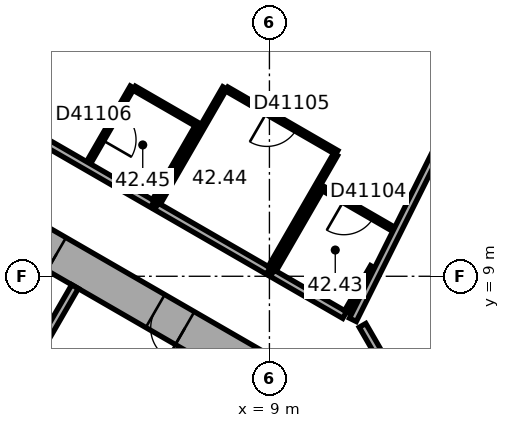
"""IFC4 building model, lengths in metres.
Left out: names, types, materials, properties, quantities, classifications, styles, units other than length and angle.
Written with IfcOpenShell. Run it as: python <this file> out.ifc"""

import sys

from ifc_helpers import new_model, si_unit, direction, frame, frame_2d, origin, place, context, subcontext, project, spatial, rectangle, extrude, element, fill, save


model = new_model("IFC4")
c1 = context("Model", 3, precision=1e-05, world=origin(), true_north=direction((0.0, 1.0)))
c2 = subcontext(c1, "Body", "Model", "MODEL_VIEW")
j1 = project(units=[si_unit("LENGTHUNIT", "METRE"), si_unit("PLANEANGLEUNIT", "RADIAN")], contexts=[c1])
p1 = place(None, origin())
s1 = spatial("IfcSite", under=j1, at=p1, CompositionType="ELEMENT")
p2 = place(p1, origin())
s2 = spatial("IfcBuilding", under=s1, at=p2, CompositionType="ELEMENT")
p3 = place(p2, frame((0.0, 0.0, 172.5)))
s3 = spatial("IfcBuildingStorey", under=s2, at=p3, CompositionType="ELEMENT", Elevation=172.5)
p4 = place(p3, frame((10.25, 5.629, 0.0), z_axis=(0.0, 0.0, 1.0), x_axis=(-0.866022616891, 0.50000482701, 0.0)))
e1 = element("IfcWall", 1, at=p4, inside=s3, PredefinedType="SHEAR", context=c2, shape_type="SweptSolid", body=[
    extrude(rectangle(XDim=12.125, YDim=1.0, at=frame_2d((6.062, 0.0))), origin(), (0.0, 0.0, 1.0), 3.7),
])
p5 = place(p4, frame((4.012, 0.0, 0.0)))
e2 = element("IfcOpeningElement", 2, at=p5, cuts=e1, PredefinedType="OPENING", context=c2, shape_type="SweptSolid", body=[
    extrude(rectangle(XDim=0.9, YDim=2.1, at=frame_2d((0.45, 1.05))), frame((0.0, 0.51, 0.0), z_axis=(0.0, -1.0, 0.0), x_axis=(1.0, 0.0, 0.0)), (0.0, 0.0, 1.0), 1.02),
])
p6 = place(p4, frame((7.912, 0.0, 0.0)))
e3 = element("IfcOpeningElement", 3, at=p6, cuts=e1, PredefinedType="OPENING", context=c2, shape_type="SweptSolid", body=[
    extrude(rectangle(XDim=0.9, YDim=2.1, at=frame_2d((0.45, 1.05))), frame((0.0, 0.51, 0.0), z_axis=(0.0, -1.0, 0.0), x_axis=(1.0, 0.0, 0.0)), (0.0, 0.0, 1.0), 1.02),
])
p7 = place(p3, frame((19.464, 14.599, 0.0), z_axis=(0.0, 0.0, 1.0), x_axis=(-0.894935755043, 0.446195018289, 0.0)))
e4 = element("IfcWall", 4, at=p7, inside=s3, PredefinedType="STANDARD", context=c2, shape_type="SweptSolid", body=[
    extrude(rectangle(XDim=20.044, YDim=0.2, at=frame_2d((10.022, 0.0))), origin(), (0.0, 0.0, 1.0), 3.7),
])
p8 = place(p7, frame((1.313, 0.0, 0.9)))
e5 = element("IfcOpeningElement", 5, at=p8, cuts=e4, PredefinedType="OPENING", context=c2, shape_type="SweptSolid", body=[
    extrude(rectangle(XDim=2.4, YDim=2.0, at=frame_2d((1.2, 1.0))), frame((0.0, 0.11, 0.0), z_axis=(0.0, -1.0, 0.0), x_axis=(1.0, 0.0, 0.0)), (0.0, 0.0, 1.0), 0.22),
])
p9 = place(p7, frame((5.067, 0.0, 0.9)))
e6 = element("IfcOpeningElement", 6, at=p9, cuts=e4, PredefinedType="OPENING", context=c2, shape_type="SweptSolid", body=[
    extrude(rectangle(XDim=2.4, YDim=2.0, at=frame_2d((1.2, 1.0))), frame((0.0, 0.11, 0.0), z_axis=(0.0, -1.0, 0.0), x_axis=(1.0, 0.0, 0.0)), (0.0, 0.0, 1.0), 0.22),
])
p10 = place(p7, frame((8.821, 0.0, 0.9)))
e7 = element("IfcOpeningElement", 7, at=p10, cuts=e4, PredefinedType="OPENING", context=c2, shape_type="SweptSolid", body=[
    extrude(rectangle(XDim=2.4, YDim=2.0, at=frame_2d((1.2, 1.0))), frame((0.0, 0.11, 0.0), z_axis=(0.0, -1.0, 0.0), x_axis=(1.0, 0.0, 0.0)), (0.0, 0.0, 1.0), 0.22),
])
p11 = place(p7, frame((12.575, 0.0, 0.9)))
e8 = element("IfcOpeningElement", 8, at=p11, cuts=e4, PredefinedType="OPENING", context=c2, shape_type="SweptSolid", body=[
    extrude(rectangle(XDim=2.4, YDim=2.0, at=frame_2d((1.2, 1.0))), frame((0.0, 0.11, 0.0), z_axis=(0.0, -1.0, 0.0), x_axis=(1.0, 0.0, 0.0)), (0.0, 0.0, 1.0), 0.22),
])
p12 = place(p7, frame((16.329, 0.0, 0.9)))
e9 = element("IfcOpeningElement", 9, at=p12, cuts=e4, PredefinedType="OPENING", context=c2, shape_type="SweptSolid", body=[
    extrude(rectangle(XDim=2.4, YDim=2.0, at=frame_2d((1.2, 1.0))), frame((0.0, 0.11, 0.0), z_axis=(0.0, -1.0, 0.0), x_axis=(1.0, 0.0, 0.0)), (0.0, 0.0, 1.0), 0.22),
])
p13 = place(p3, frame((7.424, 4.259, 0.0), z_axis=(0.0, 0.0, 1.0), x_axis=(-0.866026010844, 0.49999894854, 0.0)))
e10 = element("IfcWall", 10, at=p13, inside=s3, PredefinedType="PARTITIONING", context=c2, shape_type="SweptSolid", body=[
    extrude(rectangle(XDim=8.0, YDim=0.2, at=frame_2d((4.0, 0.0))), origin(), (0.0, 0.0, 1.0), 3.42),
])
p14 = place(p3, frame((2.784, 6.822, 0.0), z_axis=(0.0, 0.0, 1.0), x_axis=(0.50002983664, 0.866008176907, 0.0)))
e11 = element("IfcWall", 11, at=p14, inside=s3, PredefinedType="PARTITIONING", context=c2, shape_type="SweptSolid", body=[
    extrude(rectangle(XDim=2.2, YDim=0.2, at=frame_2d((1.1, 0.0))), origin(), (0.0, 0.0, 1.0), 3.42),
])
p15 = place(p3, frame((6.303, 4.617, 0.0), z_axis=(0.0, 0.0, 1.0), x_axis=(-0.866027801685, 0.499995846692, 0.0)))
e12 = element("IfcWall", 12, at=p15, inside=s3, PredefinedType="SHEAR", context=c2, shape_type="SweptSolid", body=[
    extrude(rectangle(XDim=7.06, YDim=0.3, at=frame_2d((3.53, 0.0))), origin(), (0.0, 0.0, 1.0), 3.42),
])
p16 = place(p3, frame((4.24, 11.986, 0.0), z_axis=(0.0, 0.0, 1.0), x_axis=(0.499952165731, 0.866053019151, 0.0)))
e13 = element("IfcWall", 13, at=p16, inside=s3, PredefinedType="PARTITIONING", context=c2, shape_type="SweptSolid", body=[
    extrude(rectangle(XDim=2.3, YDim=0.12, at=frame_2d((1.15, 0.0))), origin(), (0.0, 0.0, 1.0), 3.42),
])
p17 = place(p16, frame((0.7, 0.0, 0.0)))
e14 = element("IfcOpeningElement", 14, at=p17, cuts=e13, PredefinedType="OPENING", context=c2, shape_type="SweptSolid", body=[
    extrude(rectangle(XDim=0.9, YDim=2.1, at=frame_2d((0.45, 1.05))), frame((0.0, 0.07, 0.0), z_axis=(0.0, -1.0, 0.0), x_axis=(1.0, 0.0, 0.0)), (0.0, 0.0, 1.0), 0.14),
])
p18 = place(p3, frame((5.442, 13.948, 0.0), z_axis=(0.0, 0.0, 1.0), x_axis=(0.866043088465, -0.499969367985, 0.0)))
e15 = element("IfcWall", 15, at=p18, inside=s3, PredefinedType="PARTITIONING", context=c2, shape_type="SweptSolid", body=[
    extrude(rectangle(XDim=1.94, YDim=0.12, at=frame_2d((0.97, 0.0))), origin(), (0.0, 0.0, 1.0), 3.42),
])
p19 = place(p3, frame((5.922, 10.899, 0.0), z_axis=(0.0, 0.0, 1.0), x_axis=(-0.866031556924, 0.499989342298, 0.0)))
e16 = element("IfcWall", 16, at=p19, inside=s3, PredefinedType="PARTITIONING", context=c2, shape_type="SweptSolid", body=[
    extrude(rectangle(XDim=5.701, YDim=0.2, at=frame_2d((2.851, 0.0))), origin(), (0.0, 0.0, 1.0), 3.42),
])
p20 = place(p3, frame((6.076, 10.926, 0.0), z_axis=(0.0, 0.0, 1.0), x_axis=(0.500010275428, 0.866019471182, 0.0)))
e17 = element("IfcWall", 17, at=p20, inside=s3, PredefinedType="PARTITIONING", context=c2, shape_type="SweptSolid", body=[
    extrude(rectangle(XDim=3.5, YDim=0.12, at=frame_2d((1.75, 0.0))), origin(), (0.0, 0.0, 1.0), 3.42),
])
p21 = place(p3, frame((7.092, 12.926, 0.0), z_axis=(0.0, 0.0, 1.0), x_axis=(-0.500030632641, -0.866007717299, 0.0)))
e18 = element("IfcWall", 18, at=p21, inside=s3, PredefinedType="PARTITIONING", context=c2, shape_type="SweptSolid", body=[
    extrude(rectangle(XDim=2.24, YDim=0.12, at=frame_2d((1.12, 0.0))), origin(), (0.0, 0.0, 1.0), 3.42),
])
p22 = place(p3, frame((7.878, 13.927, 0.0), z_axis=(0.0, 0.0, 1.0), x_axis=(0.866021245731, -0.500007201891, 0.0)))
e19 = element("IfcWall", 19, at=p22, inside=s3, PredefinedType="PARTITIONING", context=c2, shape_type="SweptSolid", body=[
    extrude(rectangle(XDim=3.34, YDim=0.12, at=frame_2d((1.67, 0.0))), origin(), (0.0, 0.0, 1.0), 3.42),
])
p23 = place(p22, frame((1.22, 0.0, 0.0)))
e20 = element("IfcOpeningElement", 20, at=p23, cuts=e19, PredefinedType="OPENING", context=c2, shape_type="SweptSolid", body=[
    extrude(rectangle(XDim=0.9, YDim=2.1, at=frame_2d((0.45, 1.05))), frame((0.0, 0.07, 0.0), z_axis=(0.0, -1.0, 0.0), x_axis=(1.0, 0.0, 0.0)), (0.0, 0.0, 1.0), 0.14),
])
p24 = place(p3, frame((8.971, 9.139, 0.0), z_axis=(0.0, 0.0, 1.0), x_axis=(-0.866038511948, 0.499977295307, 0.0)))
e21 = element("IfcWall", 21, at=p24, inside=s3, PredefinedType="PARTITIONING", context=c2, shape_type="SweptSolid", body=[
    extrude(rectangle(XDim=3.4, YDim=0.2, at=frame_2d((1.7, 0.0))), origin(), (0.0, 0.0, 1.0), 3.42),
])
p25 = place(p3, frame((9.125, 9.166, 0.0), z_axis=(0.0, 0.0, 1.0), x_axis=(0.500004234368, 0.866022959057, 0.0)))
e22 = element("IfcWall", 22, at=p25, inside=s3, PredefinedType="PARTITIONING", context=c2, shape_type="SweptSolid", body=[
    extrude(rectangle(XDim=2.5, YDim=0.12, at=frame_2d((1.25, 0.0))), origin(), (0.0, 0.0, 1.0), 3.42),
])
p26 = place(p3, frame((10.427, 11.301, 0.0), z_axis=(0.0, 0.0, 1.0), x_axis=(0.866019511163, -0.500010206181, 0.0)))
e23 = element("IfcWall", 23, at=p26, inside=s3, PredefinedType="PARTITIONING", context=c2, shape_type="SweptSolid", body=[
    extrude(rectangle(XDim=2.13, YDim=0.12, at=frame_2d((1.065, 0.0))), origin(), (0.0, 0.0, 1.0), 3.42),
])
p27 = place(p26, frame((0.615, 0.0, 0.0)))
e24 = element("IfcOpeningElement", 24, at=p27, cuts=e23, PredefinedType="OPENING", context=c2, shape_type="SweptSolid", body=[
    extrude(rectangle(XDim=0.9, YDim=2.1, at=frame_2d((0.45, 1.05))), frame((0.0, 0.07, 0.0), z_axis=(0.0, -1.0, 0.0), x_axis=(1.0, 0.0, 0.0)), (0.0, 0.0, 1.0), 0.14),
])
p28 = place(p3, frame((10.74, 12.205, 0.0), z_axis=(0.0, 0.0, 1.0), x_axis=(-0.499978425106, -0.866037859697, 0.0)))
e25 = element("IfcWall", 25, at=p28, inside=s3, PredefinedType="PARTITIONING", context=c2, shape_type="SweptSolid", body=[
    extrude(rectangle(XDim=3.44, YDim=0.12, at=frame_2d((1.72, 0.0))), origin(), (0.0, 0.0, 1.0), 3.42),
])
p29 = place(p3, frame((10.98, 7.979, 0.0), z_axis=(0.0, 0.0, 1.0), x_axis=(-0.866008176907, 0.50002983664, 0.0)))
e26 = element("IfcWall", 26, at=p29, inside=s3, PredefinedType="PARTITIONING", context=c2, shape_type="SweptSolid", body=[
    extrude(rectangle(XDim=2.2, YDim=0.2, at=frame_2d((1.1, 0.0))), origin(), (0.0, 0.0, 1.0), 3.42),
])
p30 = place(p3, frame((11.714, 9.25, 0.0), z_axis=(0.0, 0.0, 1.0), x_axis=(-0.500015945769, -0.866016197294, 0.0)))
e27 = element("IfcWall", 27, at=p30, inside=s3, PredefinedType="PARTITIONING", context=c2, shape_type="SweptSolid", body=[
    extrude(rectangle(XDim=1.368, YDim=0.12, at=frame_2d((0.684, 0.0))), origin(), (0.0, 0.0, 1.0), 3.42),
])
p31 = place(p3, frame((12.38, 6.097, 0.0), z_axis=(0.0, 0.0, 1.0), x_axis=(-0.499964847546, 0.866045698112, 0.0)))
e28 = element("IfcWall", 28, at=p31, inside=s3, PredefinedType="PARTITIONING", context=c2, shape_type="SweptSolid", body=[
    extrude(rectangle(XDim=1.86, YDim=0.2, at=frame_2d((0.93, 0.0))), origin(), (0.0, 0.0, 1.0), 3.42),
])
p32 = place(p3, frame((15.09, 15.663, 0.0), z_axis=(0.0, 0.0, 1.0), x_axis=(-0.446206011687, -0.894930273895, 0.0)))
e29 = element("IfcWall", 29, at=p32, inside=s3, PredefinedType="PARTITIONING", context=c2, shape_type="SweptSolid", body=[
    extrude(rectangle(XDim=8.725, YDim=0.2, at=frame_2d((4.363, 0.0))), origin(), (0.0, 0.0, 1.0), 3.42),
])
p33 = place(p5, origin())
e30 = element("IfcDoor", 30, at=p33, inside=s3, OperationType="SINGLE_SWING_LEFT", PredefinedType="DOOR", context=c2, shape_type="SweptSolid", body=[
    extrude(rectangle(XDim=0.9, YDim=2.1, at=frame_2d((0.45, 1.05))), frame((0.0, 0.025, 0.0), z_axis=(0.0, -1.0, 0.0), x_axis=(1.0, 0.0, 0.0)), (0.0, 0.0, 1.0), 0.05),
])
fill(e2, e30)
p34 = place(p6, origin())
e31 = element("IfcDoor", 31, at=p34, inside=s3, OperationType="SINGLE_SWING_LEFT", PredefinedType="DOOR", context=c2, shape_type="SweptSolid", body=[
    extrude(rectangle(XDim=0.9, YDim=2.1, at=frame_2d((0.45, 1.05))), frame((0.0, 0.025, 0.0), z_axis=(0.0, -1.0, 0.0), x_axis=(1.0, 0.0, 0.0)), (0.0, 0.0, 1.0), 0.05),
])
fill(e3, e31)
p35 = place(p27, origin())
e32 = element("IfcDoor", 32, at=p35, inside=s3, OperationType="SINGLE_SWING_LEFT", PredefinedType="DOOR", context=c2, shape_type="SweptSolid", body=[
    extrude(rectangle(XDim=0.9, YDim=2.1, at=frame_2d((0.45, 1.05))), frame((0.0, 0.025, 0.0), z_axis=(0.0, -1.0, 0.0), x_axis=(1.0, 0.0, 0.0)), (0.0, 0.0, 1.0), 0.05),
])
fill(e24, e32)
p36 = place(p23, origin())
e33 = element("IfcDoor", 33, at=p36, inside=s3, OperationType="SINGLE_SWING_LEFT", PredefinedType="DOOR", context=c2, shape_type="SweptSolid", body=[
    extrude(rectangle(XDim=0.9, YDim=2.1, at=frame_2d((0.45, 1.05))), frame((0.0, 0.025, 0.0), z_axis=(0.0, -1.0, 0.0), x_axis=(1.0, 0.0, 0.0)), (0.0, 0.0, 1.0), 0.05),
])
fill(e20, e33)
p37 = place(p17, origin())
e34 = element("IfcDoor", 34, at=p37, inside=s3, OperationType="SINGLE_SWING_LEFT", PredefinedType="DOOR", context=c2, shape_type="SweptSolid", body=[
    extrude(rectangle(XDim=0.9, YDim=2.1, at=frame_2d((0.45, 1.05))), frame((0.0, 0.025, 0.0), z_axis=(0.0, -1.0, 0.0), x_axis=(1.0, 0.0, 0.0)), (0.0, 0.0, 1.0), 0.05),
])
fill(e14, e34)
save(model, sys.argv[1])
